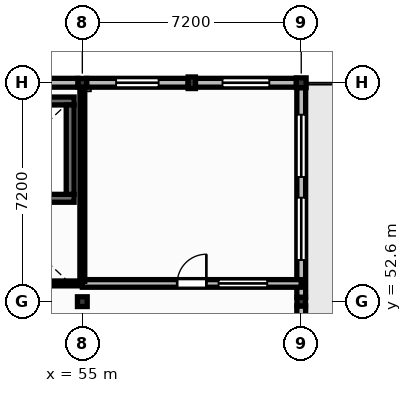
"""IFC4 building model, lengths in metres.
Left out: names, types, materials, properties, quantities, classifications, styles, units other than length and angle.
Written with IfcOpenShell. Run it as: python <this file> out.ifc"""

import sys

from ifc_helpers import new_model, si_unit, direction, frame, frame_2d, origin, origin_2d, place, context, subcontext, project, spatial, rectangle, extrude, element, fill, save


model = new_model("IFC4")
c1 = context("Model", 3, precision=1e-05, world=origin(), true_north=direction((0.0, 1.0)))
c2 = subcontext(c1, "Body", "Model", "MODEL_VIEW")
j1 = project(units=[si_unit("LENGTHUNIT", "METRE"), si_unit("PLANEANGLEUNIT", "RADIAN")], contexts=[c1])
p1 = place(None, origin())
s1 = spatial("IfcSite", under=j1, at=p1, CompositionType="ELEMENT")
p2 = place(p1, origin())
s2 = spatial("IfcBuilding", under=s1, at=p2, CompositionType="ELEMENT")
p3 = place(p2, frame((0.0, 0.0, 13.2)))
s3 = spatial("IfcBuildingStorey", under=s2, at=p3, CompositionType="ELEMENT", Elevation=13.2)
p4 = place(p3, frame((55.0, 52.6, 0.0), z_axis=(0.0, 0.0, 1.0), x_axis=(1.0, 0.0, 0.0)))
e1 = element("IfcColumn", 1, at=p4, inside=s3, PredefinedType="COLUMN", context=c2, shape_type="SweptSolid", body=[
    extrude(rectangle(XDim=0.32, YDim=0.32, at=origin_2d()), origin(), (0.0, 0.0, 1.0), 3.98),
])
for number, where, z_axis, x_axis in (
    (2, (55.0, 59.8, 0.0), (0.0, 0.0, 1.0), (1.0, 0.0, 0.0)),
    (3, (62.2, 52.6, 0.0), (0.0, 0.0, 1.0), (1.0, 0.0, 0.0)),
):
    element("IfcColumn", number, at=place(p3, frame(where, z_axis=z_axis, x_axis=x_axis)), inside=s3, PredefinedType="COLUMN", context=c2, shape_type="SweptSolid", body=[
        extrude(rectangle(XDim=0.28, YDim=0.28, at=origin_2d()), origin(), (0.0, 0.0, 1.0), 3.98),
    ])
p5 = place(p3, frame((62.2, 59.8, 0.0), z_axis=(0.0, 0.0, 1.0), x_axis=(1.0, 0.0, 0.0)))
e4 = element("IfcColumn", 4, at=p5, inside=s3, PredefinedType="COLUMN", context=c2, shape_type="SweptSolid", body=[
    extrude(rectangle(XDim=0.32, YDim=0.32, at=origin_2d()), origin(), (0.0, 0.0, 1.0), 3.98),
])
p6 = place(p3, frame((58.6, 59.8, 0.0), z_axis=(0.0, 0.0, 1.0), x_axis=(1.0, 0.0, 0.0)))
e5 = element("IfcColumn", 5, at=p6, inside=s3, PredefinedType="PILASTER", context=c2, shape_type="SweptSolid", body=[
    extrude(rectangle(XDim=0.24, YDim=0.38, at=origin_2d()), origin(), (0.0, 0.0, 1.0), 3.98),
])
p7 = place(p3, frame((51.52, 59.8, 0.0), z_axis=(0.0, 0.0, 1.0), x_axis=(1.0, 0.0, 0.0)))
e6 = element("IfcWall", 6, at=p7, inside=s3, PredefinedType="SOLIDWALL", context=c2, shape_type="SweptSolid", body=[
    extrude(rectangle(XDim=3.34, YDim=0.29, at=frame_2d((1.67, 0.0))), origin(), (0.0, 0.0, 1.0), 3.52),
])
p8 = place(p3, frame((62.2, 45.56, 0.0), z_axis=(0.0, 0.0, 1.0), x_axis=(0.0, 1.0, 0.0)))
e7 = element("IfcWall", 7, at=p8, inside=s3, PredefinedType="SOLIDWALL", context=c2, shape_type="SweptSolid", body=[
    extrude(rectangle(XDim=6.9, YDim=0.29, at=frame_2d((3.45, 0.0))), origin(), (0.0, 0.0, 1.0), 3.52),
])
p9 = place(p8, frame((2.85, 0.0, 0.0)))
e8 = element("IfcOpeningElement", 8, at=p9, cuts=e7, PredefinedType="OPENING", context=c2, shape_type="SweptSolid", body=[
    extrude(rectangle(XDim=1.2, YDim=2.25, at=frame_2d((0.6, 1.125))), frame((0.0, 0.155, 0.0), z_axis=(0.0, -1.0, 0.0), x_axis=(1.0, 0.0, 0.0)), (0.0, 0.0, 1.0), 0.31),
])
p10 = place(p8, frame((0.83, 0.0, 1.35)))
e9 = element("IfcOpeningElement", 9, at=p10, cuts=e7, PredefinedType="OPENING", context=c2, shape_type="SweptSolid", body=[
    extrude(rectangle(XDim=1.25, YDim=1.4, at=frame_2d((0.625, 0.7))), frame((0.0, 0.155, 0.0), z_axis=(0.0, -1.0, 0.0), x_axis=(1.0, 0.0, 0.0)), (0.0, 0.0, 1.0), 0.31),
])
p11 = place(p3, frame((55.14, 59.8, 0.0), z_axis=(0.0, 0.0, 1.0), x_axis=(1.0, 0.0, 0.0)))
e10 = element("IfcWall", 10, at=p11, inside=s3, PredefinedType="SOLIDWALL", context=c2, shape_type="SweptSolid", body=[
    extrude(rectangle(XDim=3.34, YDim=0.29, at=frame_2d((1.67, 0.0))), origin(), (0.0, 0.0, 1.0), 3.52),
])
p12 = place(p11, frame((0.97, 0.0, 1.05)))
e11 = element("IfcOpeningElement", 11, at=p12, cuts=e10, PredefinedType="OPENING", context=c2, shape_type="SweptSolid", body=[
    extrude(rectangle(XDim=1.4, YDim=1.65, at=frame_2d((0.7, 0.825))), frame((0.0, 0.155, 0.0), z_axis=(0.0, -1.0, 0.0), x_axis=(1.0, 0.0, 0.0)), (0.0, 0.0, 1.0), 0.31),
])
p13 = place(p3, frame((58.72, 59.8, 0.0), z_axis=(0.0, 0.0, 1.0), x_axis=(1.0, 0.0, 0.0)))
e12 = element("IfcWall", 12, at=p13, inside=s3, PredefinedType="SOLIDWALL", context=c2, shape_type="SweptSolid", body=[
    extrude(rectangle(XDim=3.32, YDim=0.29, at=frame_2d((1.66, 0.0))), origin(), (0.0, 0.0, 1.0), 3.52),
])
p14 = place(p13, frame((0.89, 0.0, 1.05)))
e13 = element("IfcOpeningElement", 13, at=p14, cuts=e12, PredefinedType="OPENING", context=c2, shape_type="SweptSolid", body=[
    extrude(rectangle(XDim=1.54, YDim=1.65, at=frame_2d((0.77, 0.825))), frame((0.0, 0.155, 0.0), z_axis=(0.0, -1.0, 0.0), x_axis=(1.0, 0.0, 0.0)), (0.0, 0.0, 1.0), 0.31),
])
p15 = place(p3, frame((62.2, 52.74, 0.0), z_axis=(0.0, 0.0, 1.0), x_axis=(0.0, 1.0, 0.0)))
e14 = element("IfcWall", 14, at=p15, inside=s3, PredefinedType="SOLIDWALL", context=c2, shape_type="SweptSolid", body=[
    extrude(rectangle(XDim=6.9, YDim=0.29, at=frame_2d((3.45, 0.0))), origin(), (0.0, 0.0, 1.0), 3.52),
])
p16 = place(p15, frame((1.23, 0.0, 1.0)))
e15 = element("IfcOpeningElement", 15, at=p16, cuts=e14, PredefinedType="OPENING", context=c2, shape_type="SweptSolid", body=[
    extrude(rectangle(XDim=2.05, YDim=1.95, at=frame_2d((1.025, 0.975))), frame((0.0, 0.155, 0.0), z_axis=(0.0, -1.0, 0.0), x_axis=(1.0, 0.0, 0.0)), (0.0, 0.0, 1.0), 0.31),
])
p17 = place(p15, frame((3.96, 0.0, 1.0)))
e16 = element("IfcOpeningElement", 16, at=p17, cuts=e14, PredefinedType="OPENING", context=c2, shape_type="SweptSolid", body=[
    extrude(rectangle(XDim=2.05, YDim=1.95, at=frame_2d((1.025, 0.975))), frame((0.0, 0.155, 0.0), z_axis=(0.0, -1.0, 0.0), x_axis=(1.0, 0.0, 0.0)), (0.0, 0.0, 1.0), 0.31),
])
for number, where, z_axis, x_axis in (
    (17, (48.07, 56.0, 0.0), (0.0, 0.0, 1.0), (1.0, 0.0, 0.0)),
    (18, (48.07, 59.2, 0.0), (0.0, 0.0, 1.0), (1.0, 0.0, 0.0)),
):
    element("IfcWall", number, at=place(p3, frame(where, z_axis=z_axis, x_axis=x_axis)), inside=s3, PredefinedType="SHEAR", context=c2, shape_type="SweptSolid", body=[
        extrude(rectangle(XDim=6.66, YDim=0.26, at=frame_2d((3.33, 0.0))), origin(), (0.0, 0.0, 1.0), 3.95),
    ])
p18 = place(p3, frame((54.6, 56.13, 0.0), z_axis=(0.0, 0.0, 1.0), x_axis=(0.0, 1.0, 0.0)))
e19 = element("IfcWall", 19, at=p18, inside=s3, PredefinedType="SHEAR", context=c2, shape_type="SweptSolid", body=[
    extrude(rectangle(XDim=2.94, YDim=0.26, at=frame_2d((1.47, 0.0))), origin(), (0.0, 0.0, 1.0), 3.95),
])
p19 = place(p3, frame((55.0, 53.2, 0.0), z_axis=(0.0, 0.0, 1.0), x_axis=(1.0, 0.0, 0.0)))
e20 = element("IfcWall", 20, at=p19, inside=s3, PredefinedType="SOLIDWALL", context=c2, shape_type="SweptSolid", body=[
    extrude(rectangle(XDim=7.2, YDim=0.25, at=frame_2d((3.6, 0.0))), origin(), (0.0, 0.0, 1.0), 3.96),
])
p20 = place(p19, frame((3.12, 0.0, 0.0)))
e21 = element("IfcOpeningElement", 21, at=p20, cuts=e20, PredefinedType="OPENING", context=c2, shape_type="SweptSolid", body=[
    extrude(rectangle(XDim=0.96, YDim=2.1, at=frame_2d((0.48, 1.05))), frame((0.0, 0.135, 0.0), z_axis=(0.0, -1.0, 0.0), x_axis=(1.0, 0.0, 0.0)), (0.0, 0.0, 1.0), 0.27),
])
p21 = place(p19, frame((4.48, 0.0, 1.05)))
e22 = element("IfcOpeningElement", 22, at=p21, cuts=e20, PredefinedType="OPENING", context=c2, shape_type="SweptSolid", body=[
    extrude(rectangle(XDim=1.6, YDim=1.1, at=frame_2d((0.8, 0.55))), frame((0.0, 0.135, 0.0), z_axis=(0.0, -1.0, 0.0), x_axis=(1.0, 0.0, 0.0)), (0.0, 0.0, 1.0), 0.27),
])
p22 = place(p3, frame((55.0, 53.2, 0.0), z_axis=(0.0, 0.0, 1.0), x_axis=(-1.0, 0.0, 0.0)))
e23 = element("IfcWall", 23, at=p22, inside=s3, PredefinedType="PARTITIONING", context=c2, shape_type="SweptSolid", body=[
    extrude(rectangle(XDim=2.8, YDim=0.16, at=frame_2d((1.4, 0.0))), origin(), (0.0, 0.0, 1.0), 3.96),
])
p23 = place(p3, frame((55.0, 53.27, 0.0), z_axis=(0.0, 0.0, 1.0), x_axis=(0.0, 1.0, 0.0)))
e24 = element("IfcWall", 24, at=p23, inside=s3, PredefinedType="PARTITIONING", context=c2, shape_type="SweptSolid", body=[
    extrude(rectangle(XDim=6.39, YDim=0.16, at=frame_2d((3.195, 0.0))), origin(), (0.0, 0.0, 1.0), 3.52),
])
p24 = place(p12, origin())
e25 = element("IfcWindow", 25, at=p24, inside=s3, PartitioningType="SINGLE_PANEL", PredefinedType="WINDOW", context=c2, shape_type="SweptSolid", body=[
    extrude(rectangle(XDim=1.4, YDim=1.65, at=frame_2d((0.7, 0.825))), frame((0.0, 0.03, 0.0), z_axis=(0.0, -1.0, 0.0), x_axis=(1.0, 0.0, 0.0)), (0.0, 0.0, 1.0), 0.06),
])
fill(e11, e25)
p25 = place(p14, origin())
e26 = element("IfcWindow", 26, at=p25, inside=s3, PartitioningType="DOUBLE_PANEL_VERTICAL", PredefinedType="WINDOW", context=c2, shape_type="SweptSolid", body=[
    extrude(rectangle(XDim=1.54, YDim=1.65, at=frame_2d((0.77, 0.825))), frame((0.0, 0.03, 0.0), z_axis=(0.0, -1.0, 0.0), x_axis=(1.0, 0.0, 0.0)), (0.0, 0.0, 1.0), 0.06),
])
fill(e13, e26)
p26 = place(p16, origin())
e27 = element("IfcWindow", 27, at=p26, inside=s3, PartitioningType="DOUBLE_PANEL_VERTICAL", PredefinedType="WINDOW", context=c2, shape_type="SweptSolid", body=[
    extrude(rectangle(XDim=2.05, YDim=1.95, at=frame_2d((1.025, 0.975))), frame((0.0, 0.03, 0.0), z_axis=(0.0, -1.0, 0.0), x_axis=(1.0, 0.0, 0.0)), (0.0, 0.0, 1.0), 0.06),
])
fill(e15, e27)
p27 = place(p17, origin())
e28 = element("IfcWindow", 28, at=p27, inside=s3, PartitioningType="DOUBLE_PANEL_VERTICAL", PredefinedType="WINDOW", context=c2, shape_type="SweptSolid", body=[
    extrude(rectangle(XDim=2.05, YDim=1.95, at=frame_2d((1.025, 0.975))), frame((0.0, 0.03, 0.0), z_axis=(0.0, -1.0, 0.0), x_axis=(1.0, 0.0, 0.0)), (0.0, 0.0, 1.0), 0.06),
])
fill(e16, e28)
p28 = place(p20, origin())
e29 = element("IfcDoor", 29, at=p28, inside=s3, OperationType="SINGLE_SWING_RIGHT", PredefinedType="DOOR", context=c2, shape_type="SweptSolid", body=[
    extrude(rectangle(XDim=0.96, YDim=2.1, at=frame_2d((0.48, 1.05))), frame((0.0, 0.025, 0.0), z_axis=(0.0, -1.0, 0.0), x_axis=(1.0, 0.0, 0.0)), (0.0, 0.0, 1.0), 0.05),
])
fill(e21, e29)
p29 = place(p21, origin())
e30 = element("IfcWindow", 30, at=p29, inside=s3, PartitioningType="SINGLE_PANEL", PredefinedType="WINDOW", context=c2, shape_type="SweptSolid", body=[
    extrude(rectangle(XDim=1.6, YDim=1.1, at=frame_2d((0.8, 0.55))), frame((0.0, 0.03, 0.0), z_axis=(0.0, -1.0, 0.0), x_axis=(1.0, 0.0, 0.0)), (0.0, 0.0, 1.0), 0.06),
])
fill(e22, e30)
save(model, sys.argv[1])
